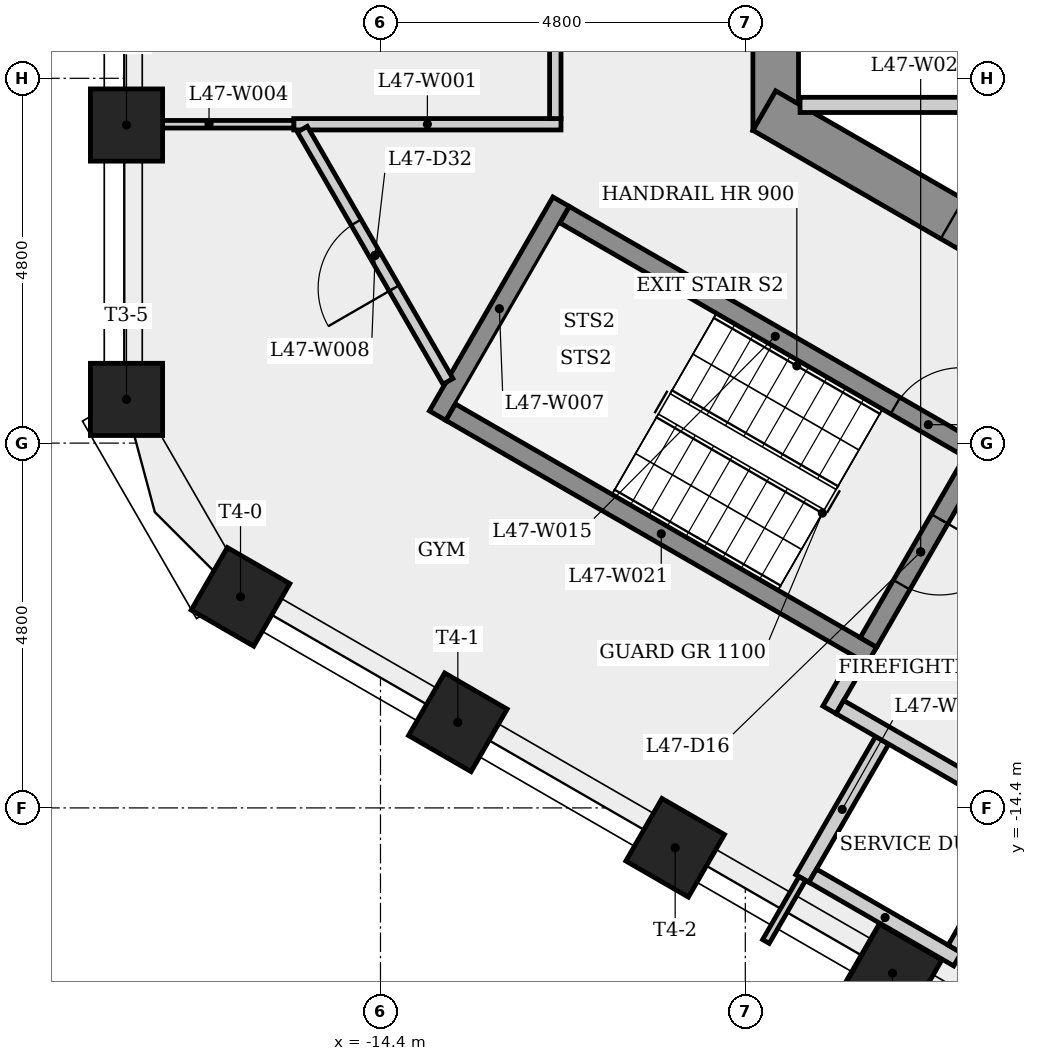
"""IFC4 building model, lengths in metres.
Left out: names, types, materials, properties, quantities, classifications, styles, units other than length and angle.
Written with IfcOpenShell. Run it as: python <this file> out.ifc"""

import sys

from ifc_helpers import new_model, si_unit, direction, frame, frame_2d, origin, origin_2d, place, context, subcontext, project, spatial, rectangle, extrude, element, fill, save


model = new_model("IFC4")
c1 = context("Model", 3, precision=1e-05, world=origin(), true_north=direction((0.0, 1.0)))
c2 = subcontext(c1, "Body", "Model", "MODEL_VIEW")
j1 = project(units=[si_unit("LENGTHUNIT", "METRE"), si_unit("PLANEANGLEUNIT", "RADIAN")], contexts=[c1])
p1 = place(None, origin())
s1 = spatial("IfcSite", under=j1, at=p1, CompositionType="ELEMENT")
p2 = place(p1, origin())
s2 = spatial("IfcBuilding", under=s1, at=p2, CompositionType="ELEMENT")
p3 = place(p2, frame((0.0, 0.0, 176.5)))
s3 = spatial("IfcBuildingStorey", under=s2, at=p3, CompositionType="ELEMENT", Elevation=176.5)
p4 = place(p3, frame((-9.2, 5.485, 0.0), z_axis=(0.0, 0.0, 1.0), x_axis=(0.0, -1.0, 0.0)))
e1 = element("IfcWall", 1, at=p4, inside=s3, PredefinedType="SHEAR", context=c2, shape_type="SweptSolid", body=[
    extrude(rectangle(XDim=10.97, YDim=0.6, at=frame_2d((5.485, 0.0))), origin(), (0.0, 0.0, 1.0), 3.4),
])
p5 = place(p4, frame((8.516, 0.0, 0.0)))
e2 = element("IfcOpeningElement", 2, at=p5, cuts=e1, PredefinedType="OPENING", context=c2, shape_type="SweptSolid", body=[
    extrude(rectangle(XDim=0.9, YDim=2.1, at=frame_2d((0.45, 1.05))), frame((0.0, 0.31, 0.0), z_axis=(0.0, -1.0, 0.0), x_axis=(1.0, 0.0, 0.0)), (0.0, 0.0, 1.0), 0.62),
])
p6 = place(p4, frame((4.685, 0.0, 0.0)))
e3 = element("IfcOpeningElement", 3, at=p6, cuts=e1, PredefinedType="OPENING", context=c2, shape_type="SweptSolid", body=[
    extrude(rectangle(XDim=1.6, YDim=2.1, at=frame_2d((0.8, 1.05))), frame((0.0, 0.31, 0.0), z_axis=(0.0, -1.0, 0.0), x_axis=(1.0, 0.0, 0.0)), (0.0, 0.0, 1.0), 0.62),
])
p7 = place(p3, frame((-9.35, -5.225, 0.0), z_axis=(0.0, 0.0, 1.0), x_axis=(0.866023993627, -0.500002442456, 0.0)))
e4 = element("IfcWall", 4, at=p7, inside=s3, PredefinedType="SHEAR", context=c2, shape_type="SweptSolid", body=[
    extrude(rectangle(XDim=10.97, YDim=0.6, at=frame_2d((5.485, 0.0))), origin(), (0.0, 0.0, 1.0), 3.4),
])
p8 = place(p7, frame((2.853, 0.0, 0.0)))
e5 = element("IfcOpeningElement", 5, at=p8, cuts=e4, PredefinedType="OPENING", context=c2, shape_type="SweptSolid", body=[
    extrude(rectangle(XDim=0.9, YDim=2.1, at=frame_2d((0.45, 1.05))), frame((0.0, 0.31, 0.0), z_axis=(0.0, -1.0, 0.0), x_axis=(1.0, 0.0, 0.0)), (0.0, 0.0, 1.0), 0.62),
])
for number, where, z_axis, x_axis in (
    (6, (-17.741, -5.415, 0.0), (0.0, 0.0, 1.0), (-1.0, 0.0, 0.0)),
    (7, (-17.741, -9.025, 0.0), (0.0, 0.0, 1.0), (-1.0, 0.0, 0.0)),
    (8, (-16.241, -11.623, 0.0), (0.0, 0.0, 1.0), (-0.5, -0.866, 0.0)),
    (9, (-13.382, -13.274, 0.0), (0.0, 0.0, 1.0), (-0.5, -0.866, 0.0)),
    (10, (-10.523, -14.925, 0.0), (0.0, 0.0, 1.0), (-0.5, -0.866, 0.0)),
    (11, (-7.664, -16.575, 0.0), (0.0, 0.0, 1.0), (-0.5, -0.866, 0.0)),
):
    element("IfcColumn", number, at=place(p3, frame(where, z_axis=z_axis, x_axis=x_axis)), inside=s3, PredefinedType="COLUMN", context=c2, shape_type="SweptSolid", body=[
        extrude(rectangle(XDim=0.95, YDim=0.95, at=origin_2d()), origin(), (0.0, 0.0, 1.0), 3.4),
    ])
p9 = place(p3, frame((-15.541, -5.405, 0.0), z_axis=(0.0, 0.0, 1.0), x_axis=(1.0, 0.0, 0.0)))
e12 = element("IfcWall", 12, at=p9, inside=s3, PredefinedType="PARTITIONING", context=c2, shape_type="SweptSolid", body=[
    extrude(rectangle(XDim=3.516, YDim=0.15, at=frame_2d((1.758, 0.0))), origin(), (0.0, 0.0, 1.0), 3.05),
])
p10 = place(p3, frame((-15.541, -5.405, 0.0), z_axis=(0.0, 0.0, 1.0), x_axis=(-1.0, 0.0, 0.0)))
e13 = element("IfcWall", 13, at=p10, inside=s3, PredefinedType="PARTITIONING", context=c2, shape_type="SweptSolid", body=[
    extrude(rectangle(XDim=2.23, YDim=0.1, at=frame_2d((1.115, 0.0))), origin(), (0.0, 0.0, 1.0), 3.05),
])
p11 = place(p3, frame((-13.648, -9.239, 0.0), z_axis=(0.0, 0.0, 1.0), x_axis=(0.500017246033, 0.866015446554, 0.0)))
e14 = element("IfcWall", 14, at=p11, inside=s3, PredefinedType="SHEAR", context=c2, shape_type="SweptSolid", body=[
    extrude(rectangle(XDim=3.25, YDim=0.25, at=frame_2d((1.625, 0.0))), origin(), (0.0, 0.0, 1.0), 3.05),
])
p12 = place(p3, frame((-13.512, -8.788, 0.0), z_axis=(0.0, 0.0, 1.0), x_axis=(-0.499983520007, 0.866034918304, 0.0)))
e15 = element("IfcWall", 15, at=p12, inside=s3, PredefinedType="PARTITIONING", context=c2, shape_type="SweptSolid", body=[
    extrude(rectangle(XDim=3.832, YDim=0.15, at=frame_2d((1.916, 0.0))), origin(), (0.0, 0.0, 1.0), 3.05),
])
p13 = place(p12, frame((1.416, 0.0, 0.0)))
e16 = element("IfcOpeningElement", 16, at=p13, cuts=e15, PredefinedType="OPENING", context=c2, shape_type="SweptSolid", body=[
    extrude(rectangle(XDim=1.0, YDim=2.1, at=frame_2d((0.5, 1.05))), frame((0.0, 0.085, 0.0), z_axis=(0.0, -1.0, 0.0), x_axis=(1.0, 0.0, 0.0)), (0.0, 0.0, 1.0), 0.17),
])
p14 = place(p3, frame((-12.1, -5.33, 0.0), z_axis=(0.0, 0.0, 1.0), x_axis=(0.0, 1.0, 0.0)))
e17 = element("IfcWall", 17, at=p14, inside=s3, PredefinedType="PARTITIONING", context=c2, shape_type="SweptSolid", body=[
    extrude(rectangle(XDim=10.809, YDim=0.15, at=frame_2d((5.405, 0.0))), origin(), (0.0, 0.0, 1.0), 3.05),
])
p15 = place(p14, frame((7.531, 0.0, 0.0)))
e18 = element("IfcOpeningElement", 18, at=p15, cuts=e17, PredefinedType="OPENING", context=c2, shape_type="SweptSolid", body=[
    extrude(rectangle(XDim=0.9, YDim=2.1, at=frame_2d((0.45, 1.05))), frame((0.0, 0.085, 0.0), z_axis=(0.0, -1.0, 0.0), x_axis=(1.0, 0.0, 0.0)), (0.0, 0.0, 1.0), 0.17),
])
p16 = place(p14, frame((4.83, 0.0, 0.0)))
e19 = element("IfcOpeningElement", 19, at=p16, cuts=e17, PredefinedType="OPENING", context=c2, shape_type="SweptSolid", body=[
    extrude(rectangle(XDim=1.0, YDim=2.1, at=frame_2d((0.5, 1.05))), frame((0.0, 0.085, 0.0), z_axis=(0.0, -1.0, 0.0), x_axis=(1.0, 0.0, 0.0)), (0.0, 0.0, 1.0), 0.17),
])
p17 = place(p14, frame((1.249, 0.0, 0.0)))
e20 = element("IfcOpeningElement", 20, at=p17, cuts=e17, PredefinedType="OPENING", context=c2, shape_type="SweptSolid", body=[
    extrude(rectangle(XDim=1.0, YDim=2.1, at=frame_2d((0.5, 1.05))), frame((0.0, 0.085, 0.0), z_axis=(0.0, -1.0, 0.0), x_axis=(1.0, 0.0, 0.0)), (0.0, 0.0, 1.0), 0.17),
])
p18 = place(p3, frame((-11.977, -6.595, 0.0), z_axis=(0.0, 0.0, 1.0), x_axis=(0.866025499775, -0.499999833739, 0.0)))
e21 = element("IfcWall", 21, at=p18, inside=s3, PredefinedType="SHEAR", context=c2, shape_type="SweptSolid", body=[
    extrude(rectangle(XDim=6.4, YDim=0.25, at=frame_2d((3.2, 0.0))), origin(), (0.0, 0.0, 1.0), 3.05),
])
p19 = place(p18, frame((5.025, 0.0, 0.0)))
e22 = element("IfcOpeningElement", 22, at=p19, cuts=e21, PredefinedType="OPENING", context=c2, shape_type="SweptSolid", body=[
    extrude(rectangle(XDim=1.0, YDim=2.1, at=frame_2d((0.5, 1.05))), frame((0.0, 0.135, 0.0), z_axis=(0.0, -1.0, 0.0), x_axis=(1.0, 0.0, 0.0)), (0.0, 0.0, 1.0), 0.27),
])
p20 = place(p3, frame((-8.88, -5.15, 0.0), z_axis=(0.0, 0.0, 1.0), x_axis=(1.0, 0.0, 0.0)))
e23 = element("IfcWall", 23, at=p20, inside=s3, PredefinedType="PARTITIONING", context=c2, shape_type="SweptSolid", body=[
    extrude(rectangle(XDim=11.205, YDim=0.2, at=frame_2d((5.603, 0.0))), origin(), (0.0, 0.0, 1.0), 3.05),
])
p21 = place(p3, frame((-8.85, -15.329, 0.0), z_axis=(0.0, 0.0, 1.0), x_axis=(0.500027713859, 0.866009402589, 0.0)))
e24 = element("IfcWall", 24, at=p21, inside=s3, PredefinedType="PLUMBINGWALL", context=c2, shape_type="SweptSolid", body=[
    extrude(rectangle(XDim=2.1, YDim=0.2, at=frame_2d((1.05, 0.0))), origin(), (0.0, 0.0, 1.0), 3.05),
])
p22 = place(p3, frame((-8.493, -13.11, 0.0), z_axis=(0.0, 0.0, 1.0), x_axis=(0.500067724834, 0.865986299303, 0.0)))
e25 = element("IfcWall", 25, at=p22, inside=s3, PredefinedType="PARTITIONING", context=c2, shape_type="SweptSolid", body=[
    extrude(rectangle(XDim=0.775, YDim=0.2, at=frame_2d((0.388, 0.0))), origin(), (0.0, 0.0, 1.0), 3.05),
])
p23 = place(p3, frame((-7.935, -12.393, 0.0), z_axis=(0.0, 0.0, 1.0), x_axis=(-0.866025499775, 0.499999833739, 0.0)))
e26 = element("IfcWall", 26, at=p23, inside=s3, PredefinedType="SHEAR", context=c2, shape_type="SweptSolid", body=[
    extrude(rectangle(XDim=6.4, YDim=0.25, at=frame_2d((3.2, 0.0))), origin(), (0.0, 0.0, 1.0), 3.05),
])
p24 = place(p3, frame((-9.329, -16.158, 0.0), z_axis=(0.0, 0.0, 1.0), x_axis=(0.499950501706, 0.866053979752, 0.0)))
e27 = element("IfcWall", 27, at=p24, inside=s3, PredefinedType="PARTITIONING", context=c2, shape_type="SweptSolid", body=[
    extrude(rectangle(XDim=0.958, YDim=0.1, at=frame_2d((0.479, 0.0))), origin(), (0.0, 0.0, 1.0), 3.05),
])
p25 = place(p3, frame((-8.356, -13.073, 0.0), z_axis=(0.0, 0.0, 1.0), x_axis=(0.866038532462, -0.499977259774, 0.0)))
e28 = element("IfcWall", 28, at=p25, inside=s3, PredefinedType="PARTITIONING", context=c2, shape_type="SweptSolid", body=[
    extrude(rectangle(XDim=4.7, YDim=0.2, at=frame_2d((2.35, 0.0))), origin(), (0.0, 0.0, 1.0), 3.05),
])
p26 = place(p3, frame((-6.808, -16.392, 0.0), z_axis=(0.0, 0.0, 1.0), x_axis=(-0.866008176907, 0.50002983664, 0.0)))
e29 = element("IfcWall", 29, at=p26, inside=s3, PredefinedType="PLUMBINGWALL", context=c2, shape_type="SweptSolid", body=[
    extrude(rectangle(XDim=2.2, YDim=0.2, at=frame_2d((1.1, 0.0))), origin(), (0.0, 0.0, 1.0), 3.05),
])
p27 = place(p3, frame((-6.605, -9.841, 0.0), z_axis=(0.0, 0.0, 1.0), x_axis=(-0.499996545922, -0.866027397988, 0.0)))
e30 = element("IfcWall", 30, at=p27, inside=s3, PredefinedType="SHEAR", context=c2, shape_type="SweptSolid", body=[
    extrude(rectangle(XDim=2.75, YDim=0.25, at=frame_2d((1.375, 0.0))), origin(), (0.0, 0.0, 1.0), 3.05),
])
p28 = place(p27, frame((0.875, 0.0, 0.0)))
e31 = element("IfcOpeningElement", 31, at=p28, cuts=e30, PredefinedType="OPENING", context=c2, shape_type="SweptSolid", body=[
    extrude(rectangle(XDim=1.0, YDim=2.1, at=frame_2d((0.5, 1.05))), frame((0.0, 0.135, 0.0), z_axis=(0.0, -1.0, 0.0), x_axis=(1.0, 0.0, 0.0)), (0.0, 0.0, 1.0), 0.27),
])
p29 = place(p3, frame((-5.895, -14.61, 0.0), z_axis=(0.0, 0.0, 1.0), x_axis=(-0.500022797313, -0.86601224135, 0.0)))
e32 = element("IfcWall", 32, at=p29, inside=s3, PredefinedType="PLUMBINGWALL", context=c2, shape_type="SweptSolid", body=[
    extrude(rectangle(XDim=1.9, YDim=0.2, at=frame_2d((0.95, 0.0))), origin(), (0.0, 0.0, 1.0), 3.05),
])
p30 = place(p19, origin())
e33 = element("IfcDoor", 33, at=p30, inside=s3, OperationType="SINGLE_SWING_RIGHT", PredefinedType="DOOR", context=c2, shape_type="SweptSolid", body=[
    extrude(rectangle(XDim=1.0, YDim=2.1, at=frame_2d((0.5, 1.05))), frame((0.0, 0.025, 0.0), z_axis=(0.0, -1.0, 0.0), x_axis=(1.0, 0.0, 0.0)), (0.0, 0.0, 1.0), 0.05),
])
fill(e22, e33)
p31 = place(p28, origin())
e34 = element("IfcDoor", 34, at=p31, inside=s3, OperationType="SINGLE_SWING_LEFT", PredefinedType="DOOR", context=c2, shape_type="SweptSolid", body=[
    extrude(rectangle(XDim=1.0, YDim=2.1, at=frame_2d((0.5, 1.05))), frame((0.0, 0.025, 0.0), z_axis=(0.0, -1.0, 0.0), x_axis=(1.0, 0.0, 0.0)), (0.0, 0.0, 1.0), 0.05),
])
fill(e31, e34)
p32 = place(p13, origin())
e35 = element("IfcDoor", 35, at=p32, inside=s3, OperationType="SINGLE_SWING_LEFT", PredefinedType="DOOR", context=c2, shape_type="SweptSolid", body=[
    extrude(rectangle(XDim=1.0, YDim=2.1, at=frame_2d((0.5, 1.05))), frame((0.0, 0.025, 0.0), z_axis=(0.0, -1.0, 0.0), x_axis=(1.0, 0.0, 0.0)), (0.0, 0.0, 1.0), 0.05),
])
fill(e16, e35)
p33 = place(p8, origin())
e36 = element("IfcDoor", 36, at=p33, inside=s3, OperationType="SINGLE_SWING_RIGHT", PredefinedType="DOOR", context=c2, shape_type="SweptSolid", body=[
    extrude(rectangle(XDim=0.9, YDim=2.1, at=frame_2d((0.45, 1.05))), frame((0.0, 0.025, 0.0), z_axis=(0.0, -1.0, 0.0), x_axis=(1.0, 0.0, 0.0)), (0.0, 0.0, 1.0), 0.05),
])
fill(e5, e36)
save(model, sys.argv[1])
